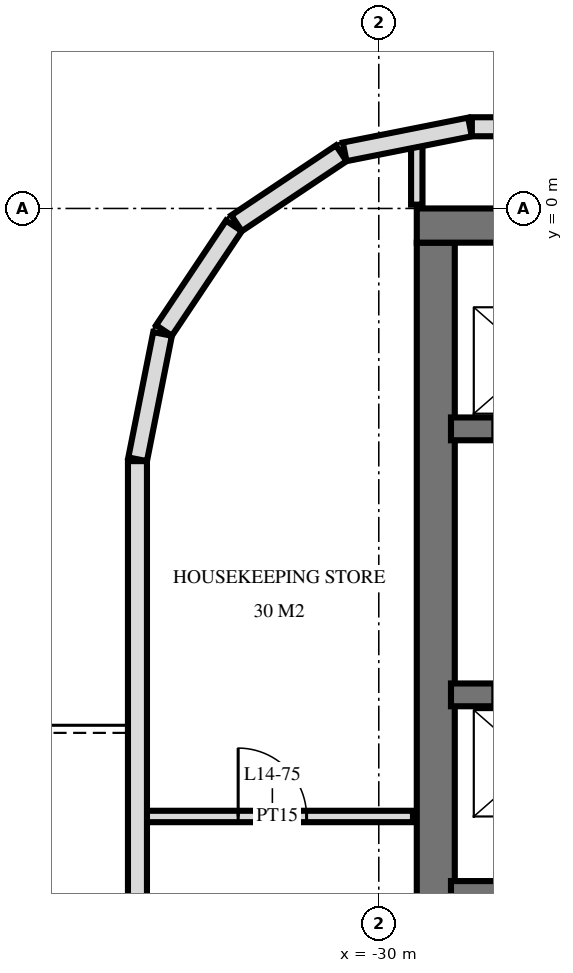
"""IFC4 building model, lengths in metres.
Left out: names, types, materials, properties, quantities, classifications, styles, units other than length and angle.
Written with IfcOpenShell. Run it as: python <this file> out.ifc"""

import sys

from ifc_helpers import new_model, si_unit, direction, frame, frame_2d, origin, place, context, subcontext, project, spatial, rectangle, extrude, element, fill, save


model = new_model("IFC4")
c1 = context("Model", 3, precision=1e-05, world=origin(), true_north=direction((0.0, 1.0)))
c2 = subcontext(c1, "Body", "Model", "MODEL_VIEW")
j1 = project(units=[si_unit("LENGTHUNIT", "METRE"), si_unit("PLANEANGLEUNIT", "RADIAN")], contexts=[c1])
p1 = place(None, origin())
s1 = spatial("IfcSite", under=j1, at=p1, CompositionType="ELEMENT")
p2 = place(p1, origin())
s2 = spatial("IfcBuilding", under=s1, at=p2, CompositionType="ELEMENT")
p3 = place(p2, frame((0.0, 0.0, 60.0)))
s3 = spatial("IfcBuildingStorey", under=s2, at=p3, CompositionType="ELEMENT", Elevation=60.0)
p4 = place(p3, frame((-29.5, -0.225, 0.0), z_axis=(0.0, 0.0, 1.0), x_axis=(1.0, 0.0, 0.0)))
e1 = element("IfcWall", 1, at=p4, inside=s3, PredefinedType="SHEAR", context=c2, shape_type="SweptSolid", body=[
    extrude(rectangle(XDim=19.5, YDim=0.45, at=frame_2d((9.75, 0.0))), origin(), (0.0, 0.0, 1.0), 3.6),
])
p5 = place(p3, frame((-29.25, -14.55, 0.0), z_axis=(0.0, 0.0, 1.0), x_axis=(0.0, 1.0, 0.0)))
e2 = element("IfcWall", 2, at=p5, inside=s3, PredefinedType="SHEAR", context=c2, shape_type="SweptSolid", body=[
    extrude(rectangle(XDim=14.1, YDim=0.5, at=frame_2d((7.05, 0.0))), origin(), (0.0, 0.0, 1.0), 3.6),
])
p6 = place(p3, frame((-29.05, -2.9, 0.0), z_axis=(0.0, 0.0, 1.0), x_axis=(1.0, 0.0, 0.0)))
e3 = element("IfcWall", 3, at=p6, inside=s3, PredefinedType="SHEAR", context=c2, shape_type="SweptSolid", body=[
    extrude(rectangle(XDim=18.7, YDim=0.3, at=frame_2d((9.35, 0.0))), origin(), (0.0, 0.0, 1.0), 3.6),
])
p7 = place(p6, frame((2.95, 0.0, 0.0)))
e4 = element("IfcOpeningElement", 4, at=p7, cuts=e3, PredefinedType="OPENING", context=c2, shape_type="SweptSolid", body=[
    extrude(rectangle(XDim=1.1, YDim=2.1, at=frame_2d((0.55, 1.05))), frame((0.0, 0.16, 0.0), z_axis=(0.0, -1.0, 0.0), x_axis=(1.0, 0.0, 0.0)), (0.0, 0.0, 1.0), 0.32),
])
p8 = place(p6, frame((0.55, 0.0, 0.0)))
e5 = element("IfcOpeningElement", 5, at=p8, cuts=e3, PredefinedType="OPENING", context=c2, shape_type="SweptSolid", body=[
    extrude(rectangle(XDim=1.1, YDim=2.1, at=frame_2d((0.55, 1.05))), frame((0.0, 0.16, 0.0), z_axis=(0.0, -1.0, 0.0), x_axis=(1.0, 0.0, 0.0)), (0.0, 0.0, 1.0), 0.32),
])
p9 = place(p6, frame((10.9, 0.0, 0.0)))
e6 = element("IfcOpeningElement", 6, at=p9, cuts=e3, PredefinedType="OPENING", context=c2, shape_type="SweptSolid", body=[
    extrude(rectangle(XDim=0.9, YDim=2.1, at=frame_2d((0.45, 1.05))), frame((0.0, 0.16, 0.0), z_axis=(0.0, -1.0, 0.0), x_axis=(1.0, 0.0, 0.0)), (0.0, 0.0, 1.0), 0.32),
])
p10 = place(p6, frame((16.85, 0.0, 0.0)))
e7 = element("IfcOpeningElement", 7, at=p10, cuts=e3, PredefinedType="OPENING", context=c2, shape_type="SweptSolid", body=[
    extrude(rectangle(XDim=1.0, YDim=2.1, at=frame_2d((0.5, 1.05))), frame((0.0, 0.16, 0.0), z_axis=(0.0, -1.0, 0.0), x_axis=(1.0, 0.0, 0.0)), (0.0, 0.0, 1.0), 0.32),
])
p11 = place(p6, frame((13.85, 0.0, 0.0)))
e8 = element("IfcOpeningElement", 8, at=p11, cuts=e3, PredefinedType="OPENING", context=c2, shape_type="SweptSolid", body=[
    extrude(rectangle(XDim=1.0, YDim=2.1, at=frame_2d((0.5, 1.05))), frame((0.0, 0.16, 0.0), z_axis=(0.0, -1.0, 0.0), x_axis=(1.0, 0.0, 0.0)), (0.0, 0.0, 1.0), 0.32),
])
p12 = place(p6, frame((5.6, 0.0, 0.0)))
e9 = element("IfcOpeningElement", 9, at=p12, cuts=e3, PredefinedType="OPENING", context=c2, shape_type="SweptSolid", body=[
    extrude(rectangle(XDim=1.0, YDim=2.1, at=frame_2d((0.5, 1.05))), frame((0.0, 0.16, 0.0), z_axis=(0.0, -1.0, 0.0), x_axis=(1.0, 0.0, 0.0)), (0.0, 0.0, 1.0), 0.32),
])
p13 = place(p3, frame((-29.05, -6.4, 0.0), z_axis=(0.0, 0.0, 1.0), x_axis=(1.0, 0.0, 0.0)))
e10 = element("IfcWall", 10, at=p13, inside=s3, PredefinedType="SHEAR", context=c2, shape_type="SweptSolid", body=[
    extrude(rectangle(XDim=18.7, YDim=0.3, at=frame_2d((9.35, 0.0))), origin(), (0.0, 0.0, 1.0), 3.6),
])
p14 = place(p13, frame((2.95, 0.0, 0.0)))
e11 = element("IfcOpeningElement", 11, at=p14, cuts=e10, PredefinedType="OPENING", context=c2, shape_type="SweptSolid", body=[
    extrude(rectangle(XDim=1.1, YDim=2.1, at=frame_2d((0.55, 1.05))), frame((0.0, 0.16, 0.0), z_axis=(0.0, -1.0, 0.0), x_axis=(1.0, 0.0, 0.0)), (0.0, 0.0, 1.0), 0.32),
])
p15 = place(p13, frame((0.55, 0.0, 0.0)))
e12 = element("IfcOpeningElement", 12, at=p15, cuts=e10, PredefinedType="OPENING", context=c2, shape_type="SweptSolid", body=[
    extrude(rectangle(XDim=1.1, YDim=2.1, at=frame_2d((0.55, 1.05))), frame((0.0, 0.16, 0.0), z_axis=(0.0, -1.0, 0.0), x_axis=(1.0, 0.0, 0.0)), (0.0, 0.0, 1.0), 0.32),
])
p16 = place(p13, frame((10.8, 0.0, 0.0)))
e13 = element("IfcOpeningElement", 13, at=p16, cuts=e10, PredefinedType="OPENING", context=c2, shape_type="SweptSolid", body=[
    extrude(rectangle(XDim=1.1, YDim=2.1, at=frame_2d((0.55, 1.05))), frame((0.0, 0.16, 0.0), z_axis=(0.0, -1.0, 0.0), x_axis=(1.0, 0.0, 0.0)), (0.0, 0.0, 1.0), 0.32),
])
p17 = place(p13, frame((5.6, 0.0, 0.0)))
e14 = element("IfcOpeningElement", 14, at=p17, cuts=e10, PredefinedType="OPENING", context=c2, shape_type="SweptSolid", body=[
    extrude(rectangle(XDim=1.0, YDim=2.1, at=frame_2d((0.5, 1.05))), frame((0.0, 0.16, 0.0), z_axis=(0.0, -1.0, 0.0), x_axis=(1.0, 0.0, 0.0)), (0.0, 0.0, 1.0), 0.32),
])
p18 = place(p3, frame((-29.05, -9.0, 0.0), z_axis=(0.0, 0.0, 1.0), x_axis=(1.0, 0.0, 0.0)))
e15 = element("IfcWall", 15, at=p18, inside=s3, PredefinedType="SHEAR", context=c2, shape_type="SweptSolid", body=[
    extrude(rectangle(XDim=18.7, YDim=0.3, at=frame_2d((9.35, 0.0))), origin(), (0.0, 0.0, 1.0), 3.6),
])
p19 = place(p18, frame((13.8, 0.0, 0.0)))
e16 = element("IfcOpeningElement", 16, at=p19, cuts=e15, PredefinedType="OPENING", context=c2, shape_type="SweptSolid", body=[
    extrude(rectangle(XDim=1.1, YDim=2.1, at=frame_2d((0.55, 1.05))), frame((0.0, 0.16, 0.0), z_axis=(0.0, -1.0, 0.0), x_axis=(1.0, 0.0, 0.0)), (0.0, 0.0, 1.0), 0.32),
])
p20 = place(p3, frame((28.775, 1.075, 0.0), z_axis=(0.0, 0.0, 1.0), x_axis=(-1.0, 0.0, 0.0)))
e17 = element("IfcWall", 17, at=p20, inside=s3, PredefinedType="SOLIDWALL", context=c2, shape_type="SweptSolid", body=[
    extrude(rectangle(XDim=57.551, YDim=0.25, at=frame_2d((28.775, 0.0))), origin(), (0.0, 0.0, 1.0), 3.32),
])
p21 = place(p20, frame((21.275, 0.0, 0.3)))
e18 = element("IfcOpeningElement", 18, at=p21, cuts=e17, PredefinedType="OPENING", context=c2, shape_type="SweptSolid", body=[
    extrude(rectangle(XDim=2.4, YDim=2.1, at=frame_2d((1.2, 1.05))), frame((0.0, 0.135, 0.0), z_axis=(0.0, -1.0, 0.0), x_axis=(1.0, 0.0, 0.0)), (0.0, 0.0, 1.0), 0.27),
])
p22 = place(p20, frame((24.275, 0.0, 0.3)))
e19 = element("IfcOpeningElement", 19, at=p22, cuts=e17, PredefinedType="OPENING", context=c2, shape_type="SweptSolid", body=[
    extrude(rectangle(XDim=2.4, YDim=2.1, at=frame_2d((1.2, 1.05))), frame((0.0, 0.135, 0.0), z_axis=(0.0, -1.0, 0.0), x_axis=(1.0, 0.0, 0.0)), (0.0, 0.0, 1.0), 0.27),
])
p23 = place(p3, frame((-28.8, 1.073, 0.0), z_axis=(0.0, 0.0, 1.0), x_axis=(-0.980803419081, -0.194999110559, 0.0)))
e20 = element("IfcWall", 20, at=p23, inside=s3, PredefinedType="SOLIDWALL", context=c2, shape_type="SweptSolid", body=[
    extrude(rectangle(XDim=1.681, YDim=0.25, at=frame_2d((0.841, 0.0))), origin(), (0.0, 0.0, 1.0), 3.32),
])
for number, where, z_axis, x_axis in (
    (21, (-30.494, 0.726, 0.0), (0.0, 0.0, 1.0), (-0.831, -0.556, 0.0)),
    (22, (-31.906, -0.229, 0.0), (0.0, 0.0, 1.0), (-0.556, -0.831, 0.0)),
):
    element("IfcWall", number, at=place(p3, frame(where, z_axis=z_axis, x_axis=x_axis)), inside=s3, PredefinedType="SOLIDWALL", context=c2, shape_type="SweptSolid", body=[
        extrude(rectangle(XDim=1.656, YDim=0.25, at=frame_2d((0.828, 0.0))), origin(), (0.0, 0.0, 1.0), 3.32),
    ])
p24 = place(p3, frame((-32.844, -1.651, 0.0), z_axis=(0.0, 0.0, 1.0), x_axis=(-0.19513878023, -0.980775640221, 0.0)))
e23 = element("IfcWall", 23, at=p24, inside=s3, PredefinedType="SOLIDWALL", context=c2, shape_type="SweptSolid", body=[
    extrude(rectangle(XDim=1.681, YDim=0.25, at=frame_2d((0.841, 0.0))), origin(), (0.0, 0.0, 1.0), 3.32),
])
p25 = place(p3, frame((-33.175, -3.325, 0.0), z_axis=(0.0, 0.0, 1.0), x_axis=(0.0, -1.0, 0.0)))
e24 = element("IfcWall", 24, at=p25, inside=s3, PredefinedType="SOLIDWALL", context=c2, shape_type="SweptSolid", body=[
    extrude(rectangle(XDim=21.551, YDim=0.25, at=frame_2d((10.775, 0.0))), origin(), (0.0, 0.0, 1.0), 3.32),
])
p26 = place(p25, frame((7.275, 0.0, 0.0)))
e25 = element("IfcOpeningElement", 25, at=p26, cuts=e24, PredefinedType="OPENING", context=c2, shape_type="SweptSolid", body=[
    extrude(rectangle(XDim=1.8, YDim=2.4, at=frame_2d((0.9, 1.2))), frame((0.0, 0.135, 0.0), z_axis=(0.0, -1.0, 0.0), x_axis=(1.0, 0.0, 0.0)), (0.0, 0.0, 1.0), 0.27),
])
p27 = place(p25, frame((12.075, 0.0, 0.3)))
e26 = element("IfcOpeningElement", 26, at=p27, cuts=e24, PredefinedType="OPENING", context=c2, shape_type="SweptSolid", body=[
    extrude(rectangle(XDim=1.2, YDim=2.1, at=frame_2d((0.6, 1.05))), frame((0.0, 0.135, 0.0), z_axis=(0.0, -1.0, 0.0), x_axis=(1.0, 0.0, 0.0)), (0.0, 0.0, 1.0), 0.27),
])
p28 = place(p25, frame((14.875, 0.0, 0.0)))
e27 = element("IfcOpeningElement", 27, at=p28, cuts=e24, PredefinedType="OPENING", context=c2, shape_type="SweptSolid", body=[
    extrude(rectangle(XDim=1.8, YDim=2.4, at=frame_2d((0.9, 1.2))), frame((0.0, 0.135, 0.0), z_axis=(0.0, -1.0, 0.0), x_axis=(1.0, 0.0, 0.0)), (0.0, 0.0, 1.0), 0.27),
])
p29 = place(p25, frame((18.875, 0.0, 0.0)))
e28 = element("IfcOpeningElement", 28, at=p29, cuts=e24, PredefinedType="OPENING", context=c2, shape_type="SweptSolid", body=[
    extrude(rectangle(XDim=1.8, YDim=2.4, at=frame_2d((0.9, 1.2))), frame((0.0, 0.135, 0.0), z_axis=(0.0, -1.0, 0.0), x_axis=(1.0, 0.0, 0.0)), (0.0, 0.0, 1.0), 0.27),
])
p30 = place(p3, frame((-29.5, 0.05, 0.0), z_axis=(0.0, 0.0, 1.0), x_axis=(0.0, 1.0, 0.0)))
e29 = element("IfcWall", 29, at=p30, inside=s3, PredefinedType="PARTITIONING", context=c2, shape_type="SweptSolid", body=[
    extrude(rectangle(XDim=0.827, YDim=0.15, at=frame_2d((0.414, 0.0))), origin(), (0.0, 0.0, 1.0), 3.32),
])
p31 = place(p3, frame((-33.12, -8.0, 0.0), z_axis=(0.0, 0.0, 1.0), x_axis=(1.0, 0.0, 0.0)))
e30 = element("IfcWall", 30, at=p31, inside=s3, PredefinedType="PARTITIONING", context=c2, shape_type="SweptSolid", body=[
    extrude(rectangle(XDim=3.57, YDim=0.15, at=frame_2d((1.785, 0.0))), origin(), (0.0, 0.0, 1.0), 3.32),
])
p32 = place(p31, frame((1.27, 0.0, 0.0)))
e31 = element("IfcOpeningElement", 31, at=p32, cuts=e30, PredefinedType="OPENING", context=c2, shape_type="SweptSolid", body=[
    extrude(rectangle(XDim=0.9, YDim=2.1, at=frame_2d((0.45, 1.05))), frame((0.0, 0.085, 0.0), z_axis=(0.0, -1.0, 0.0), x_axis=(1.0, 0.0, 0.0)), (0.0, 0.0, 1.0), 0.17),
])
p33 = place(p32, origin())
e32 = element("IfcDoor", 32, at=p33, inside=s3, OperationType="SINGLE_SWING_RIGHT", PredefinedType="DOOR", context=c2, shape_type="SweptSolid", body=[
    extrude(rectangle(XDim=0.9, YDim=2.1, at=frame_2d((0.45, 1.05))), frame((0.0, 0.025, 0.0), z_axis=(0.0, -1.0, 0.0), x_axis=(1.0, 0.0, 0.0)), (0.0, 0.0, 1.0), 0.05),
])
fill(e31, e32)
save(model, sys.argv[1])
